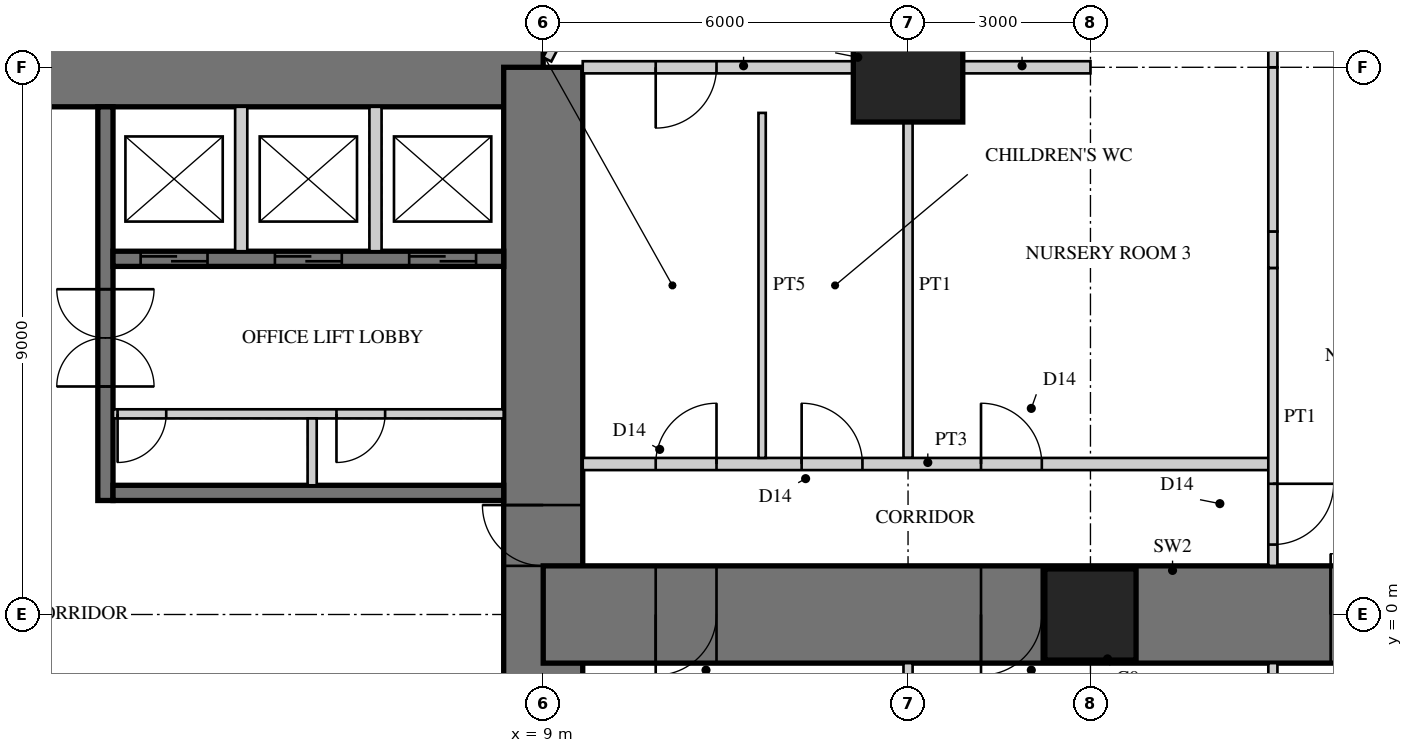
"""IFC4 building model, lengths in metres.
Left out: names, types, materials, properties, quantities, classifications, styles, units other than length and angle.
Written with IfcOpenShell. Run it as: python <this file> out.ifc"""

import sys

from ifc_helpers import new_model, si_unit, direction, frame, frame_2d, origin, origin_2d, place, context, subcontext, project, spatial, rectangle, extrude, element, fill, save


model = new_model("IFC4")
c1 = context("Model", 3, precision=1e-05, world=origin(), true_north=direction((0.0, 1.0)))
c2 = subcontext(c1, "Body", "Model", "MODEL_VIEW")
j1 = project(units=[si_unit("LENGTHUNIT", "METRE"), si_unit("PLANEANGLEUNIT", "RADIAN")], contexts=[c1])
p1 = place(None, origin())
s1 = spatial("IfcSite", under=j1, at=p1, CompositionType="ELEMENT")
p2 = place(p1, origin())
s2 = spatial("IfcBuilding", under=s1, at=p2, CompositionType="ELEMENT")
p3 = place(p2, origin())
s3 = spatial("IfcBuildingStorey", under=s2, at=p3, CompositionType="ELEMENT", Elevation=0.0)
p4 = place(p3, frame((9.0, 9.0, 0.0), z_axis=(0.0, 0.0, 1.0), x_axis=(-1.0, 0.0, 0.0)))
e1 = element("IfcWall", 1, at=p4, inside=s3, PredefinedType="SHEAR", context=c2, shape_type="SweptSolid", body=[
    extrude(rectangle(XDim=18.0, YDim=1.3, at=frame_2d((9.0, 0.0))), origin(), (0.0, 0.0, 1.0), 5.0),
])
p5 = place(p4, frame((9.8, 0.0, 0.0)))
e2 = element("IfcOpeningElement", 2, at=p5, cuts=e1, PredefinedType="OPENING", context=c2, shape_type="SweptSolid", body=[
    extrude(rectangle(XDim=1.0, YDim=2.4, at=frame_2d((0.5, 1.2))), frame((0.0, 0.66, 0.0), z_axis=(0.0, -1.0, 0.0), x_axis=(1.0, 0.0, 0.0)), (0.0, 0.0, 1.0), 1.32),
])
p6 = place(p3, frame((9.0, -9.0, 0.0), z_axis=(0.0, 0.0, 1.0), x_axis=(0.0, 1.0, 0.0)))
e3 = element("IfcWall", 3, at=p6, inside=s3, PredefinedType="SHEAR", context=c2, shape_type="SweptSolid", body=[
    extrude(rectangle(XDim=18.0, YDim=1.3, at=frame_2d((9.0, 0.0))), origin(), (0.0, 0.0, 1.0), 5.0),
])
p7 = place(p6, frame((9.8, 0.0, 0.0)))
e4 = element("IfcOpeningElement", 4, at=p7, cuts=e3, PredefinedType="OPENING", context=c2, shape_type="SweptSolid", body=[
    extrude(rectangle(XDim=1.0, YDim=2.4, at=frame_2d((0.5, 1.2))), frame((0.0, 0.66, 0.0), z_axis=(0.0, -1.0, 0.0), x_axis=(1.0, 0.0, 0.0)), (0.0, 0.0, 1.0), 1.32),
])
p8 = place(p3, frame((1.8, 1.875, 0.0), z_axis=(0.0, 0.0, 1.0), x_axis=(0.0, 1.0, 0.0)))
e5 = element("IfcWall", 5, at=p8, inside=s3, PredefinedType="SHEAR", context=c2, shape_type="SweptSolid", body=[
    extrude(rectangle(XDim=6.475, YDim=0.25, at=frame_2d((3.238, 0.0))), origin(), (0.0, 0.0, 1.0), 5.0),
])
p9 = place(p8, frame((1.875, 0.0, 0.0)))
e6 = element("IfcOpeningElement", 6, at=p9, cuts=e5, PredefinedType="OPENING", context=c2, shape_type="SweptSolid", body=[
    extrude(rectangle(XDim=1.6, YDim=2.4, at=frame_2d((0.8, 1.2))), frame((0.0, 0.135, 0.0), z_axis=(0.0, -1.0, 0.0), x_axis=(1.0, 0.0, 0.0)), (0.0, 0.0, 1.0), 0.27),
])
p10 = place(p3, frame((1.925, 2.0, 0.0), z_axis=(0.0, 0.0, 1.0), x_axis=(1.0, 0.0, 0.0)))
e7 = element("IfcWall", 7, at=p10, inside=s3, PredefinedType="SHEAR", context=c2, shape_type="SweptSolid", body=[
    extrude(rectangle(XDim=6.425, YDim=0.25, at=frame_2d((3.212, 0.0))), origin(), (0.0, 0.0, 1.0), 5.0),
])
p11 = place(p3, frame((1.925, 5.85, 0.0), z_axis=(0.0, 0.0, 1.0), x_axis=(1.0, 0.0, 0.0)))
e8 = element("IfcWall", 8, at=p11, inside=s3, PredefinedType="SHEAR", context=c2, shape_type="SweptSolid", body=[
    extrude(rectangle(XDim=6.425, YDim=0.25, at=frame_2d((3.212, 0.0))), origin(), (0.0, 0.0, 1.0), 5.0),
])
p12 = place(p11, frame((0.454, 0.0, 0.0)))
e9 = element("IfcOpeningElement", 9, at=p12, cuts=e8, PredefinedType="OPENING", context=c2, shape_type="SweptSolid", body=[
    extrude(rectangle(XDim=1.1, YDim=2.2, at=frame_2d((0.55, 1.1))), frame((0.0, 0.135, 0.0), z_axis=(0.0, -1.0, 0.0), x_axis=(1.0, 0.0, 0.0)), (0.0, 0.0, 1.0), 0.27),
])
p13 = place(p11, frame((2.663, 0.0, 0.0)))
e10 = element("IfcOpeningElement", 10, at=p13, cuts=e8, PredefinedType="OPENING", context=c2, shape_type="SweptSolid", body=[
    extrude(rectangle(XDim=1.1, YDim=2.2, at=frame_2d((0.55, 1.1))), frame((0.0, 0.135, 0.0), z_axis=(0.0, -1.0, 0.0), x_axis=(1.0, 0.0, 0.0)), (0.0, 0.0, 1.0), 0.27),
])
p14 = place(p11, frame((4.871, 0.0, 0.0)))
e11 = element("IfcOpeningElement", 11, at=p14, cuts=e8, PredefinedType="OPENING", context=c2, shape_type="SweptSolid", body=[
    extrude(rectangle(XDim=1.1, YDim=2.2, at=frame_2d((0.55, 1.1))), frame((0.0, 0.135, 0.0), z_axis=(0.0, -1.0, 0.0), x_axis=(1.0, 0.0, 0.0)), (0.0, 0.0, 1.0), 0.27),
])
p15 = place(p3, frame((1.925, 3.3, 0.0), z_axis=(0.0, 0.0, 1.0), x_axis=(1.0, 0.0, 0.0)))
e12 = element("IfcWall", 12, at=p15, inside=s3, PredefinedType="PARTITIONING", context=c2, shape_type="SweptSolid", body=[
    extrude(rectangle(XDim=6.425, YDim=0.15, at=frame_2d((3.212, 0.0))), origin(), (0.0, 0.0, 1.0), 5.0),
])
p16 = place(p15, frame((0.075, 0.0, 0.0)))
e13 = element("IfcOpeningElement", 13, at=p16, cuts=e12, PredefinedType="OPENING", context=c2, shape_type="SweptSolid", body=[
    extrude(rectangle(XDim=0.8, YDim=2.1, at=frame_2d((0.4, 1.05))), frame((0.0, 0.085, 0.0), z_axis=(0.0, -1.0, 0.0), x_axis=(1.0, 0.0, 0.0)), (0.0, 0.0, 1.0), 0.17),
])
p17 = place(p15, frame((3.675, 0.0, 0.0)))
e14 = element("IfcOpeningElement", 14, at=p17, cuts=e12, PredefinedType="OPENING", context=c2, shape_type="SweptSolid", body=[
    extrude(rectangle(XDim=0.8, YDim=2.1, at=frame_2d((0.4, 1.05))), frame((0.0, 0.085, 0.0), z_axis=(0.0, -1.0, 0.0), x_axis=(1.0, 0.0, 0.0)), (0.0, 0.0, 1.0), 0.17),
])
p18 = place(p3, frame((5.2, 2.125, 0.0), z_axis=(0.0, 0.0, 1.0), x_axis=(0.0, 1.0, 0.0)))
e15 = element("IfcWall", 15, at=p18, inside=s3, PredefinedType="PARTITIONING", context=c2, shape_type="SweptSolid", body=[
    extrude(rectangle(XDim=1.1, YDim=0.15, at=frame_2d((0.55, 0.0))), origin(), (0.0, 0.0, 1.0), 5.0),
])
for number, where, z_axis, x_axis in (
    (16, (4.033, 5.975, 0.0), (0.0, 0.0, 1.0), (0.0, 1.0, 0.0)),
    (17, (6.242, 5.975, 0.0), (0.0, 0.0, 1.0), (0.0, 1.0, 0.0)),
):
    element("IfcWall", number, at=place(p3, frame(where, z_axis=z_axis, x_axis=x_axis)), inside=s3, PredefinedType="PARTITIONING", context=c2, shape_type="SweptSolid", body=[
        extrude(rectangle(XDim=2.375, YDim=0.2, at=frame_2d((1.188, 0.0))), origin(), (0.0, 0.0, 1.0), 5.0),
    ])
p19 = place(p3, frame((9.0, 0.0, 0.0), z_axis=(0.0, 0.0, 1.0), x_axis=(1.0, 0.0, 0.0)))
e18 = element("IfcWall", 18, at=p19, inside=s3, PredefinedType="SHEAR", context=c2, shape_type="SweptSolid", body=[
    extrude(rectangle(XDim=18.0, YDim=1.6, at=frame_2d((9.0, 0.0))), origin(), (0.0, 0.0, 1.0), 5.0),
])
p20 = place(p19, frame((1.85, 0.0, 0.0)))
e19 = element("IfcOpeningElement", 19, at=p20, cuts=e18, PredefinedType="OPENING", context=c2, shape_type="SweptSolid", body=[
    extrude(rectangle(XDim=1.0, YDim=2.2, at=frame_2d((0.5, 1.1))), frame((0.0, 0.81, 0.0), z_axis=(0.0, -1.0, 0.0), x_axis=(1.0, 0.0, 0.0)), (0.0, 0.0, 1.0), 1.62),
])
p21 = place(p19, frame((7.2, 0.0, 0.0)))
e20 = element("IfcOpeningElement", 20, at=p21, cuts=e18, PredefinedType="OPENING", context=c2, shape_type="SweptSolid", body=[
    extrude(rectangle(XDim=1.0, YDim=2.2, at=frame_2d((0.5, 1.1))), frame((0.0, 0.81, 0.0), z_axis=(0.0, -1.0, 0.0), x_axis=(1.0, 0.0, 0.0)), (0.0, 0.0, 1.0), 1.62),
])
p22 = place(p19, frame((12.95, 0.0, 0.0)))
e21 = element("IfcOpeningElement", 21, at=p22, cuts=e18, PredefinedType="OPENING", context=c2, shape_type="SweptSolid", body=[
    extrude(rectangle(XDim=1.0, YDim=2.2, at=frame_2d((0.5, 1.1))), frame((0.0, 0.81, 0.0), z_axis=(0.0, -1.0, 0.0), x_axis=(1.0, 0.0, 0.0)), (0.0, 0.0, 1.0), 1.62),
])
p23 = place(p3, frame((15.0, 9.0, 0.0), z_axis=(0.0, 0.0, 1.0), x_axis=(1.0, 0.0, 0.0)))
e22 = element("IfcColumn", 22, at=p23, inside=s3, PredefinedType="COLUMN", context=c2, shape_type="SweptSolid", body=[
    extrude(rectangle(XDim=1.8, YDim=1.8, at=origin_2d()), origin(), (0.0, 0.0, 1.0), 5.0),
])
p24 = place(p3, frame((18.0, 0.0, 0.0), z_axis=(0.0, 0.0, 1.0), x_axis=(1.0, 0.0, 0.0)))
e23 = element("IfcColumn", 23, at=p24, inside=s3, PredefinedType="COLUMN", context=c2, shape_type="SweptSolid", body=[
    extrude(rectangle(XDim=1.5, YDim=1.5, at=origin_2d()), origin(), (0.0, 0.0, 1.0), 5.0),
])
p25 = place(p3, frame((15.0, 2.575, 0.0), z_axis=(0.0, 0.0, 1.0), x_axis=(0.0, 1.0, 0.0)))
e24 = element("IfcWall", 24, at=p25, inside=s3, PredefinedType="PARTITIONING", context=c2, shape_type="SweptSolid", body=[
    extrude(rectangle(XDim=5.675, YDim=0.15, at=frame_2d((2.837, 0.0))), origin(), (0.0, 0.0, 1.0), 3.85),
])
p26 = place(p3, frame((15.0, -8.25, 0.0), z_axis=(0.0, 0.0, 1.0), x_axis=(0.0, 1.0, 0.0)))
e25 = element("IfcWall", 25, at=p26, inside=s3, PredefinedType="PARTITIONING", context=c2, shape_type="SweptSolid", body=[
    extrude(rectangle(XDim=7.45, YDim=0.15, at=frame_2d((3.725, 0.0))), origin(), (0.0, 0.0, 1.0), 3.85),
])
p27 = place(p3, frame((9.65, 2.475, 0.0), z_axis=(0.0, 0.0, 1.0), x_axis=(1.0, 0.0, 0.0)))
e26 = element("IfcWall", 26, at=p27, inside=s3, PredefinedType="SOLIDWALL", context=c2, shape_type="SweptSolid", body=[
    extrude(rectangle(XDim=11.35, YDim=0.2, at=frame_2d((5.675, 0.0))), origin(), (0.0, 0.0, 1.0), 4.8),
])
p28 = place(p27, frame((1.2, 0.0, 0.0)))
e27 = element("IfcOpeningElement", 27, at=p28, cuts=e26, PredefinedType="OPENING", context=c2, shape_type="SweptSolid", body=[
    extrude(rectangle(XDim=1.0, YDim=2.2, at=frame_2d((0.5, 1.1))), frame((0.0, 0.11, 0.0), z_axis=(0.0, -1.0, 0.0), x_axis=(1.0, 0.0, 0.0)), (0.0, 0.0, 1.0), 0.22),
])
p29 = place(p27, frame((3.6, 0.0, 0.0)))
e28 = element("IfcOpeningElement", 28, at=p29, cuts=e26, PredefinedType="OPENING", context=c2, shape_type="SweptSolid", body=[
    extrude(rectangle(XDim=1.0, YDim=2.2, at=frame_2d((0.5, 1.1))), frame((0.0, 0.11, 0.0), z_axis=(0.0, -1.0, 0.0), x_axis=(1.0, 0.0, 0.0)), (0.0, 0.0, 1.0), 0.22),
])
p30 = place(p27, frame((6.55, 0.0, 0.0)))
e29 = element("IfcOpeningElement", 29, at=p30, cuts=e26, PredefinedType="OPENING", context=c2, shape_type="SweptSolid", body=[
    extrude(rectangle(XDim=1.0, YDim=2.2, at=frame_2d((0.5, 1.1))), frame((0.0, 0.11, 0.0), z_axis=(0.0, -1.0, 0.0), x_axis=(1.0, 0.0, 0.0)), (0.0, 0.0, 1.0), 0.22),
])
p31 = place(p3, frame((21.0, -5.7, 0.0), z_axis=(0.0, 0.0, 1.0), x_axis=(0.0, 1.0, 0.0)))
e30 = element("IfcWall", 30, at=p31, inside=s3, PredefinedType="PARTITIONING", context=c2, shape_type="SweptSolid", body=[
    extrude(rectangle(XDim=4.9, YDim=0.15, at=frame_2d((2.45, 0.0))), origin(), (0.0, 0.0, 1.0), 3.85),
])
p32 = place(p3, frame((21.0, 0.8, 0.0), z_axis=(0.0, 0.0, 1.0), x_axis=(0.0, 1.0, 0.0)))
e31 = element("IfcWall", 31, at=p32, inside=s3, PredefinedType="PARTITIONING", context=c2, shape_type="SweptSolid", body=[
    extrude(rectangle(XDim=4.9, YDim=0.15, at=frame_2d((2.45, 0.0))), origin(), (0.0, 0.0, 1.0), 3.85),
])
p33 = place(p32, frame((0.35, 0.0, 0.0)))
e32 = element("IfcOpeningElement", 32, at=p33, cuts=e31, PredefinedType="OPENING", context=c2, shape_type="SweptSolid", body=[
    extrude(rectangle(XDim=1.0, YDim=2.2, at=frame_2d((0.5, 1.1))), frame((0.0, 0.085, 0.0), z_axis=(0.0, -1.0, 0.0), x_axis=(1.0, 0.0, 0.0)), (0.0, 0.0, 1.0), 0.17),
])
p34 = place(p3, frame((21.0, 5.7, 0.0), z_axis=(0.0, 0.0, 1.0), x_axis=(0.0, 1.0, 0.0)))
e33 = element("IfcWall", 33, at=p34, inside=s3, PredefinedType="PARTITIONING", context=c2, shape_type="SweptSolid", body=[
    extrude(rectangle(XDim=0.6, YDim=0.15, at=frame_2d((0.3, 0.0))), origin(), (0.0, 0.0, 1.0), 4.8),
])
p35 = place(p3, frame((21.0, 6.3, 0.0), z_axis=(0.0, 0.0, 1.0), x_axis=(0.0, 1.0, 0.0)))
e34 = element("IfcWall", 34, at=p35, inside=s3, PredefinedType="PARTITIONING", context=c2, shape_type="SweptSolid", body=[
    extrude(rectangle(XDim=2.7, YDim=0.15, at=frame_2d((1.35, 0.0))), origin(), (0.0, 0.0, 1.0), 3.85),
])
p36 = place(p3, frame((21.0, 9.0, 0.0), z_axis=(0.0, 0.0, 1.0), x_axis=(0.0, 1.0, 0.0)))
e35 = element("IfcWall", 35, at=p36, inside=s3, PredefinedType="PARTITIONING", context=c2, shape_type="SweptSolid", body=[
    extrude(rectangle(XDim=0.72, YDim=0.15, at=frame_2d((0.36, 0.0))), origin(), (0.0, 0.0, 1.0), 4.8),
])
p37 = place(p3, frame((12.6, 2.575, 0.0), z_axis=(0.0, 0.0, 1.0), x_axis=(0.0, 1.0, 0.0)))
e36 = element("IfcWall", 36, at=p37, inside=s3, PredefinedType="PLUMBINGWALL", context=c2, shape_type="SweptSolid", body=[
    extrude(rectangle(XDim=5.675, YDim=0.12, at=frame_2d((2.837, 0.0))), origin(), (0.0, 0.0, 1.0), 4.8),
])
p38 = place(p3, frame((9.067, 9.129, 0.0), z_axis=(0.0, 0.0, 1.0), x_axis=(0.457956589674, 0.888974556427, 0.0)))
e37 = element("IfcWall", 37, at=p38, inside=s3, PredefinedType="PARTITIONING", context=c2, shape_type="SweptSolid", body=[
    extrude(rectangle(XDim=7.268, YDim=0.15, at=frame_2d((3.634, 0.0))), origin(), (0.0, 0.0, 1.0), 4.8),
])
p39 = place(p38, frame((1.254, 0.0, 0.0)))
e38 = element("IfcOpeningElement", 38, at=p39, cuts=e37, PredefinedType="OPENING", context=c2, shape_type="SweptSolid", body=[
    extrude(rectangle(XDim=1.0, YDim=2.2, at=frame_2d((0.5, 1.1))), frame((0.0, 0.085, 0.0), z_axis=(0.0, -1.0, 0.0), x_axis=(1.0, 0.0, 0.0)), (0.0, 0.0, 1.0), 0.17),
])
p40 = place(p3, frame((9.65, 9.0, 0.0), z_axis=(0.0, 0.0, 1.0), x_axis=(1.0, 0.0, 0.0)))
e39 = element("IfcWall", 39, at=p40, inside=s3, PredefinedType="SOLIDWALL", context=c2, shape_type="SweptSolid", body=[
    extrude(rectangle(XDim=4.6, YDim=0.2, at=frame_2d((2.3, 0.0))), origin(), (0.0, 0.0, 1.0), 3.8),
])
p41 = place(p40, frame((1.2, 0.0, 0.0)))
e40 = element("IfcOpeningElement", 40, at=p41, cuts=e39, PredefinedType="OPENING", context=c2, shape_type="SweptSolid", body=[
    extrude(rectangle(XDim=1.0, YDim=2.2, at=frame_2d((0.5, 1.1))), frame((0.0, 0.11, 0.0), z_axis=(0.0, -1.0, 0.0), x_axis=(1.0, 0.0, 0.0)), (0.0, 0.0, 1.0), 0.22),
])
p42 = place(p3, frame((15.75, 9.0, 0.0), z_axis=(0.0, 0.0, 1.0), x_axis=(1.0, 0.0, 0.0)))
e41 = element("IfcWall", 41, at=p42, inside=s3, PredefinedType="SOLIDWALL", context=c2, shape_type="SweptSolid", body=[
    extrude(rectangle(XDim=2.25, YDim=0.2, at=frame_2d((1.125, 0.0))), origin(), (0.0, 0.0, 1.0), 3.8),
])
p43 = place(p28, origin())
e42 = element("IfcDoor", 42, at=p43, inside=s3, OperationType="SINGLE_SWING_RIGHT", PredefinedType="DOOR", context=c2, shape_type="SweptSolid", body=[
    extrude(rectangle(XDim=1.0, YDim=2.2, at=frame_2d((0.5, 1.1))), frame((0.0, 0.025, 0.0), z_axis=(0.0, -1.0, 0.0), x_axis=(1.0, 0.0, 0.0)), (0.0, 0.0, 1.0), 0.05),
])
fill(e27, e42)
p44 = place(p29, origin())
e43 = element("IfcDoor", 43, at=p44, inside=s3, OperationType="SINGLE_SWING_LEFT", PredefinedType="DOOR", context=c2, shape_type="SweptSolid", body=[
    extrude(rectangle(XDim=1.0, YDim=2.2, at=frame_2d((0.5, 1.1))), frame((0.0, 0.025, 0.0), z_axis=(0.0, -1.0, 0.0), x_axis=(1.0, 0.0, 0.0)), (0.0, 0.0, 1.0), 0.05),
])
fill(e28, e43)
p45 = place(p30, origin())
e44 = element("IfcDoor", 44, at=p45, inside=s3, OperationType="SINGLE_SWING_LEFT", PredefinedType="DOOR", context=c2, shape_type="SweptSolid", body=[
    extrude(rectangle(XDim=1.0, YDim=2.2, at=frame_2d((0.5, 1.1))), frame((0.0, 0.025, 0.0), z_axis=(0.0, -1.0, 0.0), x_axis=(1.0, 0.0, 0.0)), (0.0, 0.0, 1.0), 0.05),
])
fill(e29, e44)
p46 = place(p33, frame((1.0, 0.0, 0.0), z_axis=(0.0, 0.0, 1.0), x_axis=(-1.0, 0.0, 0.0)))
e45 = element("IfcDoor", 45, at=p46, inside=s3, OperationType="SINGLE_SWING_LEFT", PredefinedType="DOOR", context=c2, shape_type="SweptSolid", body=[
    extrude(rectangle(XDim=1.0, YDim=2.2, at=frame_2d((0.5, 1.1))), frame((0.0, 0.025, 0.0), z_axis=(0.0, -1.0, 0.0), x_axis=(1.0, 0.0, 0.0)), (0.0, 0.0, 1.0), 0.05),
])
fill(e32, e45)
p47 = place(p41, frame((1.0, 0.0, 0.0), z_axis=(0.0, 0.0, 1.0), x_axis=(-1.0, 0.0, 0.0)))
e46 = element("IfcDoor", 46, at=p47, inside=s3, OperationType="SINGLE_SWING_RIGHT", PredefinedType="DOOR", context=c2, shape_type="SweptSolid", body=[
    extrude(rectangle(XDim=1.0, YDim=2.2, at=frame_2d((0.5, 1.1))), frame((0.0, 0.025, 0.0), z_axis=(0.0, -1.0, 0.0), x_axis=(1.0, 0.0, 0.0)), (0.0, 0.0, 1.0), 0.05),
])
fill(e40, e46)
p48 = place(p20, frame((1.0, 0.0, 0.0), z_axis=(0.0, 0.0, 1.0), x_axis=(-1.0, 0.0, 0.0)))
e47 = element("IfcDoor", 47, at=p48, inside=s3, OperationType="SINGLE_SWING_RIGHT", PredefinedType="DOOR", context=c2, shape_type="SweptSolid", body=[
    extrude(rectangle(XDim=1.0, YDim=2.2, at=frame_2d((0.5, 1.1))), frame((0.0, 0.025, 0.0), z_axis=(0.0, -1.0, 0.0), x_axis=(1.0, 0.0, 0.0)), (0.0, 0.0, 1.0), 0.05),
])
fill(e19, e47)
p49 = place(p21, frame((1.0, 0.0, 0.0), z_axis=(0.0, 0.0, 1.0), x_axis=(-1.0, 0.0, 0.0)))
e48 = element("IfcDoor", 48, at=p49, inside=s3, OperationType="SINGLE_SWING_RIGHT", PredefinedType="DOOR", context=c2, shape_type="SweptSolid", body=[
    extrude(rectangle(XDim=1.0, YDim=2.2, at=frame_2d((0.5, 1.1))), frame((0.0, 0.025, 0.0), z_axis=(0.0, -1.0, 0.0), x_axis=(1.0, 0.0, 0.0)), (0.0, 0.0, 1.0), 0.05),
])
fill(e20, e48)
p50 = place(p22, origin())
e49 = element("IfcDoor", 49, at=p50, inside=s3, OperationType="SINGLE_SWING_LEFT", PredefinedType="DOOR", context=c2, shape_type="SweptSolid", body=[
    extrude(rectangle(XDim=1.0, YDim=2.2, at=frame_2d((0.5, 1.1))), frame((0.0, 0.025, 0.0), z_axis=(0.0, -1.0, 0.0), x_axis=(1.0, 0.0, 0.0)), (0.0, 0.0, 1.0), 0.05),
])
fill(e21, e49)
p51 = place(p7, origin())
e50 = element("IfcDoor", 50, at=p51, inside=s3, OperationType="SINGLE_SWING_RIGHT", PredefinedType="DOOR", context=c2, shape_type="SweptSolid", body=[
    extrude(rectangle(XDim=1.0, YDim=2.4, at=frame_2d((0.5, 1.2))), frame((0.0, 0.055, 0.0), z_axis=(0.0, -1.0, 0.0), x_axis=(1.0, 0.0, 0.0)), (0.0, 0.0, 1.0), 0.05),
])
fill(e4, e50)
p52 = place(p12, origin())
e51 = element("IfcDoor", 51, at=p52, inside=s3, OperationType="DOUBLE_DOOR_SLIDING", PredefinedType="DOOR", context=c2, shape_type="SweptSolid", body=[
    extrude(rectangle(XDim=1.1, YDim=2.2, at=frame_2d((0.55, 1.1))), frame((0.0, 0.025, 0.0), z_axis=(0.0, -1.0, 0.0), x_axis=(1.0, 0.0, 0.0)), (0.0, 0.0, 1.0), 0.05),
])
fill(e9, e51)
p53 = place(p13, origin())
e52 = element("IfcDoor", 52, at=p53, inside=s3, OperationType="DOUBLE_DOOR_SLIDING", PredefinedType="DOOR", context=c2, shape_type="SweptSolid", body=[
    extrude(rectangle(XDim=1.1, YDim=2.2, at=frame_2d((0.55, 1.1))), frame((0.0, 0.025, 0.0), z_axis=(0.0, -1.0, 0.0), x_axis=(1.0, 0.0, 0.0)), (0.0, 0.0, 1.0), 0.05),
])
fill(e10, e52)
p54 = place(p14, origin())
e53 = element("IfcDoor", 53, at=p54, inside=s3, OperationType="DOUBLE_DOOR_SLIDING", PredefinedType="DOOR", context=c2, shape_type="SweptSolid", body=[
    extrude(rectangle(XDim=1.1, YDim=2.2, at=frame_2d((0.55, 1.1))), frame((0.0, 0.025, 0.0), z_axis=(0.0, -1.0, 0.0), x_axis=(1.0, 0.0, 0.0)), (0.0, 0.0, 1.0), 0.05),
])
fill(e11, e53)
p55 = place(p9, origin())
e54 = element("IfcDoor", 54, at=p55, inside=s3, OperationType="DOUBLE_DOOR_DOUBLE_SWING", PredefinedType="DOOR", context=c2, shape_type="SweptSolid", body=[
    extrude(rectangle(XDim=1.6, YDim=2.4, at=frame_2d((0.8, 1.2))), frame((0.0, 0.025, 0.0), z_axis=(0.0, -1.0, 0.0), x_axis=(1.0, 0.0, 0.0)), (0.0, 0.0, 1.0), 0.05),
])
fill(e6, e54)
p56 = place(p16, frame((0.8, 0.0, 0.0), z_axis=(0.0, 0.0, 1.0), x_axis=(-1.0, 0.0, 0.0)))
e55 = element("IfcDoor", 55, at=p56, inside=s3, OperationType="SINGLE_SWING_RIGHT", PredefinedType="DOOR", context=c2, shape_type="SweptSolid", body=[
    extrude(rectangle(XDim=0.8, YDim=2.1, at=frame_2d((0.4, 1.05))), frame((0.0, 0.025, 0.0), z_axis=(0.0, -1.0, 0.0), x_axis=(1.0, 0.0, 0.0)), (0.0, 0.0, 1.0), 0.05),
])
fill(e13, e55)
p57 = place(p17, frame((0.8, 0.0, 0.0), z_axis=(0.0, 0.0, 1.0), x_axis=(-1.0, 0.0, 0.0)))
e56 = element("IfcDoor", 56, at=p57, inside=s3, OperationType="SINGLE_SWING_RIGHT", PredefinedType="DOOR", context=c2, shape_type="SweptSolid", body=[
    extrude(rectangle(XDim=0.8, YDim=2.1, at=frame_2d((0.4, 1.05))), frame((0.0, 0.025, 0.0), z_axis=(0.0, -1.0, 0.0), x_axis=(1.0, 0.0, 0.0)), (0.0, 0.0, 1.0), 0.05),
])
fill(e14, e56)
save(model, sys.argv[1])
